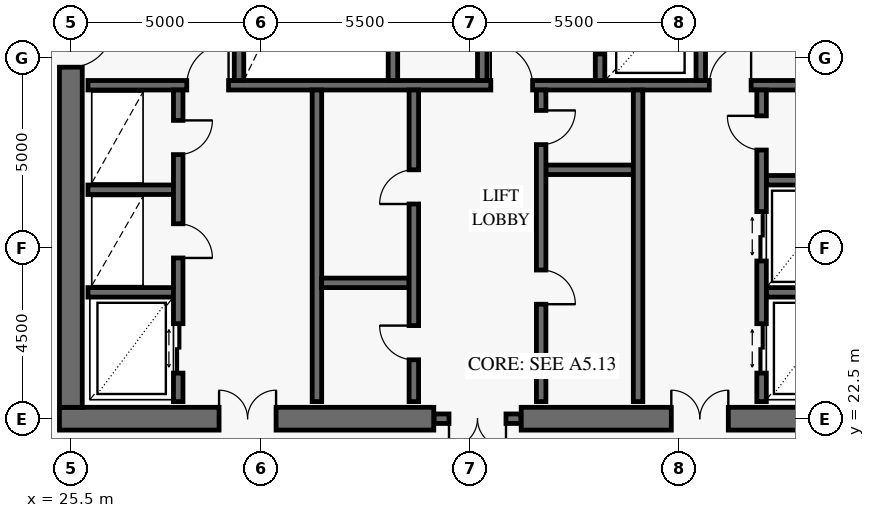
"""IFC4 building model, lengths in metres.
Left out: names, types, materials, properties, quantities, classifications, styles, units other than length and angle.
Written with IfcOpenShell. Run it as: python <this file> out.ifc"""

import sys

from ifc_helpers import new_model, si_unit, direction, frame, frame_2d, origin, place, context, subcontext, project, spatial, rectangle, extrude, element, fill, save


model = new_model("IFC4")
c1 = context("Model", 3, precision=1e-05, world=origin(), true_north=direction((0.0, 1.0)))
c2 = subcontext(c1, "Body", "Model", "MODEL_VIEW")
j1 = project(units=[si_unit("LENGTHUNIT", "METRE"), si_unit("PLANEANGLEUNIT", "RADIAN")], contexts=[c1])
p1 = place(None, origin())
s1 = spatial("IfcSite", under=j1, at=p1, CompositionType="ELEMENT")
p2 = place(p1, origin())
s2 = spatial("IfcBuilding", under=s1, at=p2, CompositionType="ELEMENT")
p3 = place(p2, frame((0.0, 0.0, 295.8)))
s3 = spatial("IfcBuildingStorey", under=s2, at=p3, CompositionType="ELEMENT", Elevation=295.8)
p4 = place(p3, frame((25.2, 22.5, 0.0), z_axis=(0.0, 0.0, 1.0), x_axis=(1.0, 0.0, 0.0)))
e1 = element("IfcWall", 1, at=p4, inside=s3, PredefinedType="SHEAR", context=c2, shape_type="SweptSolid", body=[
    extrude(rectangle(XDim=9.85, YDim=0.6, at=frame_2d((4.925, 0.0))), origin(), (0.0, 0.0, 1.0), 3.8),
])
p5 = place(p4, frame((4.2, 0.0, 0.0)))
e2 = element("IfcOpeningElement", 2, at=p5, cuts=e1, PredefinedType="OPENING", context=c2, shape_type="SweptSolid", body=[
    extrude(rectangle(XDim=1.5, YDim=2.15, at=frame_2d((0.75, 1.075))), frame((0.0, 0.312, 0.0), z_axis=(0.0, -1.0, 0.0), x_axis=(1.0, 0.0, 0.0)), (0.0, 0.0, 1.0), 0.624),
])
p6 = place(p3, frame((37.35, 22.5, 0.0), z_axis=(0.0, 0.0, 1.0), x_axis=(1.0, 0.0, 0.0)))
e3 = element("IfcWall", 3, at=p6, inside=s3, PredefinedType="SHEAR", context=c2, shape_type="SweptSolid", body=[
    extrude(rectangle(XDim=9.45, YDim=0.6, at=frame_2d((4.725, 0.0))), origin(), (0.0, 0.0, 1.0), 3.8),
])
p7 = place(p6, frame((3.95, 0.0, 0.0)))
e4 = element("IfcOpeningElement", 4, at=p7, cuts=e3, PredefinedType="OPENING", context=c2, shape_type="SweptSolid", body=[
    extrude(rectangle(XDim=1.5, YDim=2.15, at=frame_2d((0.75, 1.075))), frame((0.0, 0.312, 0.0), z_axis=(0.0, -1.0, 0.0), x_axis=(1.0, 0.0, 0.0)), (0.0, 0.0, 1.0), 0.624),
])
p8 = place(p3, frame((25.5, 22.8, 0.0), z_axis=(0.0, 0.0, 1.0), x_axis=(0.0, 1.0, 0.0)))
e5 = element("IfcWall", 5, at=p8, inside=s3, PredefinedType="SHEAR", context=c2, shape_type="SweptSolid", body=[
    extrude(rectangle(XDim=18.4, YDim=0.6, at=frame_2d((9.2, 0.0))), origin(), (0.0, 0.0, 1.0), 3.8),
])
p9 = place(p8, frame((8.95, 0.0, 0.0)))
e6 = element("IfcOpeningElement", 6, at=p9, cuts=e5, PredefinedType="OPENING", context=c2, shape_type="SweptSolid", body=[
    extrude(rectangle(XDim=1.1, YDim=2.15, at=frame_2d((0.55, 1.075))), frame((0.0, 0.312, 0.0), z_axis=(0.0, -1.0, 0.0), x_axis=(1.0, 0.0, 0.0)), (0.0, 0.0, 1.0), 0.624),
])
p10 = place(p3, frame((35.06, 22.5, 0.0), z_axis=(0.0, 0.0, 1.0), x_axis=(1.0, 0.0, 0.0)))
e7 = element("IfcWall", 7, at=p10, inside=s3, PredefinedType="SOLIDWALL", context=c2, shape_type="SweptSolid", body=[
    extrude(rectangle(XDim=2.28, YDim=0.25, at=frame_2d((1.14, 0.0))), origin(), (0.0, 0.0, 1.0), 3.8),
])
p11 = place(p10, frame((0.39, 0.0, 0.0)))
e8 = element("IfcOpeningElement", 8, at=p11, cuts=e7, PredefinedType="OPENING", context=c2, shape_type="SweptSolid", body=[
    extrude(rectangle(XDim=1.5, YDim=2.15, at=frame_2d((0.75, 1.075))), frame((0.0, 0.137, 0.0), z_axis=(0.0, -1.0, 0.0), x_axis=(1.0, 0.0, 0.0)), (0.0, 0.0, 1.0), 0.274),
])
p12 = place(p3, frame((25.95, 31.275, 0.0), z_axis=(0.0, 0.0, 1.0), x_axis=(1.0, 0.0, 0.0)))
e9 = element("IfcWall", 9, at=p12, inside=s3, PredefinedType="SOLIDWALL", context=c2, shape_type="SweptSolid", body=[
    extrude(rectangle(XDim=20.1, YDim=0.25, at=frame_2d((10.05, 0.0))), origin(), (0.0, 0.0, 1.0), 3.8),
])
p13 = place(p12, frame((2.6, 0.0, 0.0)))
e10 = element("IfcOpeningElement", 10, at=p13, cuts=e9, PredefinedType="OPENING", context=c2, shape_type="SweptSolid", body=[
    extrude(rectangle(XDim=1.1, YDim=2.15, at=frame_2d((0.55, 1.075))), frame((0.0, 0.137, 0.0), z_axis=(0.0, -1.0, 0.0), x_axis=(1.0, 0.0, 0.0)), (0.0, 0.0, 1.0), 0.274),
])
p14 = place(p12, frame((10.6, 0.0, 0.0)))
e11 = element("IfcOpeningElement", 11, at=p14, cuts=e9, PredefinedType="OPENING", context=c2, shape_type="SweptSolid", body=[
    extrude(rectangle(XDim=1.1, YDim=2.15, at=frame_2d((0.55, 1.075))), frame((0.0, 0.137, 0.0), z_axis=(0.0, -1.0, 0.0), x_axis=(1.0, 0.0, 0.0)), (0.0, 0.0, 1.0), 0.274),
])
p15 = place(p12, frame((16.35, 0.0, 0.0)))
e12 = element("IfcOpeningElement", 12, at=p15, cuts=e9, PredefinedType="OPENING", context=c2, shape_type="SweptSolid", body=[
    extrude(rectangle(XDim=1.1, YDim=2.15, at=frame_2d((0.55, 1.075))), frame((0.0, 0.137, 0.0), z_axis=(0.0, -1.0, 0.0), x_axis=(1.0, 0.0, 0.0)), (0.0, 0.0, 1.0), 0.274),
])
for number, where, z_axis, x_axis in (
    (13, (29.925, 31.4, 0.0), (0.0, 0.0, 1.0), (0.0, 1.0, 0.0)),
    (14, (33.975, 31.4, 0.0), (0.0, 0.0, 1.0), (0.0, 1.0, 0.0)),
    (15, (42.075, 31.4, 0.0), (0.0, 0.0, 1.0), (0.0, 1.0, 0.0)),
):
    element("IfcWall", number, at=place(p3, frame(where, z_axis=z_axis, x_axis=x_axis)), inside=s3, PredefinedType="SOLIDWALL", context=c2, shape_type="SweptSolid", body=[
        extrude(rectangle(XDim=9.7, YDim=0.25, at=frame_2d((4.85, 0.0))), origin(), (0.0, 0.0, 1.0), 3.8),
    ])
p16 = place(p3, frame((36.325, 31.4, 0.0), z_axis=(0.0, 0.0, 1.0), x_axis=(0.0, 1.0, 0.0)))
e16 = element("IfcWall", 16, at=p16, inside=s3, PredefinedType="SOLIDWALL", context=c2, shape_type="SweptSolid", body=[
    extrude(rectangle(XDim=9.65, YDim=0.25, at=frame_2d((4.825, 0.0))), origin(), (0.0, 0.0, 1.0), 3.8),
])
p17 = place(p16, frame((2.965, 0.0, 0.0)))
e17 = element("IfcOpeningElement", 17, at=p17, cuts=e16, PredefinedType="OPENING", context=c2, shape_type="SweptSolid", body=[
    extrude(rectangle(XDim=0.9, YDim=2.1, at=frame_2d((0.45, 1.05))), frame((0.0, 0.137, 0.0), z_axis=(0.0, -1.0, 0.0), x_axis=(1.0, 0.0, 0.0)), (0.0, 0.0, 1.0), 0.274),
])
p18 = place(p16, frame((7.885, 0.0, 0.0)))
e18 = element("IfcOpeningElement", 18, at=p18, cuts=e16, PredefinedType="OPENING", context=c2, shape_type="SweptSolid", body=[
    extrude(rectangle(XDim=0.9, YDim=2.1, at=frame_2d((0.45, 1.05))), frame((0.0, 0.137, 0.0), z_axis=(0.0, -1.0, 0.0), x_axis=(1.0, 0.0, 0.0)), (0.0, 0.0, 1.0), 0.274),
])
p19 = place(p3, frame((39.425, 31.4, 0.0), z_axis=(0.0, 0.0, 1.0), x_axis=(0.0, 1.0, 0.0)))
e19 = element("IfcWall", 19, at=p19, inside=s3, PredefinedType="SOLIDWALL", context=c2, shape_type="SweptSolid", body=[
    extrude(rectangle(XDim=9.65, YDim=0.25, at=frame_2d((4.825, 0.0))), origin(), (0.0, 0.0, 1.0), 3.8),
])
p20 = place(p19, frame((0.7, 0.0, 0.0)))
e20 = element("IfcOpeningElement", 20, at=p20, cuts=e19, PredefinedType="OPENING", context=c2, shape_type="SweptSolid", body=[
    extrude(rectangle(XDim=1.1, YDim=2.2, at=frame_2d((0.55, 1.1))), frame((0.0, 0.137, 0.0), z_axis=(0.0, -1.0, 0.0), x_axis=(1.0, 0.0, 0.0)), (0.0, 0.0, 1.0), 0.274),
])
p21 = place(p19, frame((3.45, 0.0, 0.0)))
e21 = element("IfcOpeningElement", 21, at=p21, cuts=e19, PredefinedType="OPENING", context=c2, shape_type="SweptSolid", body=[
    extrude(rectangle(XDim=1.1, YDim=2.2, at=frame_2d((0.55, 1.1))), frame((0.0, 0.137, 0.0), z_axis=(0.0, -1.0, 0.0), x_axis=(1.0, 0.0, 0.0)), (0.0, 0.0, 1.0), 0.274),
])
p22 = place(p19, frame((6.2, 0.0, 0.0)))
e22 = element("IfcOpeningElement", 22, at=p22, cuts=e19, PredefinedType="OPENING", context=c2, shape_type="SweptSolid", body=[
    extrude(rectangle(XDim=1.1, YDim=2.2, at=frame_2d((0.55, 1.1))), frame((0.0, 0.137, 0.0), z_axis=(0.0, -1.0, 0.0), x_axis=(1.0, 0.0, 0.0)), (0.0, 0.0, 1.0), 0.274),
])
p23 = place(p19, frame((8.47, 0.0, 0.0)))
e23 = element("IfcOpeningElement", 23, at=p23, cuts=e19, PredefinedType="OPENING", context=c2, shape_type="SweptSolid", body=[
    extrude(rectangle(XDim=0.9, YDim=2.1, at=frame_2d((0.45, 1.05))), frame((0.0, 0.137, 0.0), z_axis=(0.0, -1.0, 0.0), x_axis=(1.0, 0.0, 0.0)), (0.0, 0.0, 1.0), 0.274),
])
for number, where, z_axis, x_axis in (
    (24, (25.95, 25.825, 0.0), (0.0, 0.0, 1.0), (1.0, 0.0, 0.0)),
    (25, (25.95, 28.525, 0.0), (0.0, 0.0, 1.0), (1.0, 0.0, 0.0)),
):
    element("IfcWall", number, at=place(p3, frame(where, z_axis=z_axis, x_axis=x_axis)), inside=s3, PredefinedType="SOLIDWALL", context=c2, shape_type="SweptSolid", body=[
        extrude(rectangle(XDim=2.25, YDim=0.25, at=frame_2d((1.125, 0.0))), origin(), (0.0, 0.0, 1.0), 3.8),
    ])
p24 = place(p3, frame((28.325, 22.95, 0.0), z_axis=(0.0, 0.0, 1.0), x_axis=(0.0, 1.0, 0.0)))
e26 = element("IfcWall", 26, at=p24, inside=s3, PredefinedType="SOLIDWALL", context=c2, shape_type="SweptSolid", body=[
    extrude(rectangle(XDim=8.2, YDim=0.25, at=frame_2d((4.1, 0.0))), origin(), (0.0, 0.0, 1.0), 3.8),
])
p25 = place(p24, frame((0.75, 0.0, 0.0)))
e27 = element("IfcOpeningElement", 27, at=p25, cuts=e26, PredefinedType="OPENING", context=c2, shape_type="SweptSolid", body=[
    extrude(rectangle(XDim=1.3, YDim=2.3, at=frame_2d((0.65, 1.15))), frame((0.0, 0.137, 0.0), z_axis=(0.0, -1.0, 0.0), x_axis=(1.0, 0.0, 0.0)), (0.0, 0.0, 1.0), 0.274),
])
p26 = place(p24, frame((3.78, 0.0, 0.0)))
e28 = element("IfcOpeningElement", 28, at=p26, cuts=e26, PredefinedType="OPENING", context=c2, shape_type="SweptSolid", body=[
    extrude(rectangle(XDim=0.9, YDim=2.1, at=frame_2d((0.45, 1.05))), frame((0.0, 0.137, 0.0), z_axis=(0.0, -1.0, 0.0), x_axis=(1.0, 0.0, 0.0)), (0.0, 0.0, 1.0), 0.274),
])
p27 = place(p24, frame((6.5, 0.0, 0.0)))
e29 = element("IfcOpeningElement", 29, at=p27, cuts=e26, PredefinedType="OPENING", context=c2, shape_type="SweptSolid", body=[
    extrude(rectangle(XDim=0.9, YDim=2.1, at=frame_2d((0.45, 1.05))), frame((0.0, 0.137, 0.0), z_axis=(0.0, -1.0, 0.0), x_axis=(1.0, 0.0, 0.0)), (0.0, 0.0, 1.0), 0.274),
])
p28 = place(p3, frame((31.975, 22.95, 0.0), z_axis=(0.0, 0.0, 1.0), x_axis=(0.0, 1.0, 0.0)))
e30 = element("IfcWall", 30, at=p28, inside=s3, PredefinedType="SOLIDWALL", context=c2, shape_type="SweptSolid", body=[
    extrude(rectangle(XDim=8.2, YDim=0.25, at=frame_2d((4.1, 0.0))), origin(), (0.0, 0.0, 1.0), 3.8),
])
p29 = place(p3, frame((32.1, 26.075, 0.0), z_axis=(0.0, 0.0, 1.0), x_axis=(1.0, 0.0, 0.0)))
e31 = element("IfcWall", 31, at=p29, inside=s3, PredefinedType="SOLIDWALL", context=c2, shape_type="SweptSolid", body=[
    extrude(rectangle(XDim=2.3, YDim=0.25, at=frame_2d((1.15, 0.0))), origin(), (0.0, 0.0, 1.0), 3.8),
])
p30 = place(p3, frame((34.525, 22.95, 0.0), z_axis=(0.0, 0.0, 1.0), x_axis=(0.0, 1.0, 0.0)))
e32 = element("IfcWall", 32, at=p30, inside=s3, PredefinedType="SOLIDWALL", context=c2, shape_type="SweptSolid", body=[
    extrude(rectangle(XDim=8.2, YDim=0.25, at=frame_2d((4.1, 0.0))), origin(), (0.0, 0.0, 1.0), 3.8),
])
p31 = place(p30, frame((1.1, 0.0, 0.0)))
e33 = element("IfcOpeningElement", 33, at=p31, cuts=e32, PredefinedType="OPENING", context=c2, shape_type="SweptSolid", body=[
    extrude(rectangle(XDim=0.9, YDim=2.1, at=frame_2d((0.45, 1.05))), frame((0.0, 0.137, 0.0), z_axis=(0.0, -1.0, 0.0), x_axis=(1.0, 0.0, 0.0)), (0.0, 0.0, 1.0), 0.274),
])
p32 = place(p30, frame((5.2, 0.0, 0.0)))
e34 = element("IfcOpeningElement", 34, at=p32, cuts=e32, PredefinedType="OPENING", context=c2, shape_type="SweptSolid", body=[
    extrude(rectangle(XDim=0.9, YDim=2.1, at=frame_2d((0.45, 1.05))), frame((0.0, 0.137, 0.0), z_axis=(0.0, -1.0, 0.0), x_axis=(1.0, 0.0, 0.0)), (0.0, 0.0, 1.0), 0.274),
])
p33 = place(p3, frame((38.0, 29.05, 0.0), z_axis=(0.0, 0.0, 1.0), x_axis=(1.0, 0.0, 0.0)))
e35 = element("IfcWall", 35, at=p33, inside=s3, PredefinedType="SOLIDWALL", context=c2, shape_type="SweptSolid", body=[
    extrude(rectangle(XDim=2.3, YDim=0.25, at=frame_2d((1.15, 0.0))), origin(), (0.0, 0.0, 1.0), 3.8),
])
p34 = place(p3, frame((37.875, 22.95, 0.0), z_axis=(0.0, 0.0, 1.0), x_axis=(0.0, 1.0, 0.0)))
e36 = element("IfcWall", 36, at=p34, inside=s3, PredefinedType="SOLIDWALL", context=c2, shape_type="SweptSolid", body=[
    extrude(rectangle(XDim=8.2, YDim=0.25, at=frame_2d((4.1, 0.0))), origin(), (0.0, 0.0, 1.0), 3.8),
])
p35 = place(p34, frame((2.562, 0.0, 0.0)))
e37 = element("IfcOpeningElement", 37, at=p35, cuts=e36, PredefinedType="OPENING", context=c2, shape_type="SweptSolid", body=[
    extrude(rectangle(XDim=0.9, YDim=2.1, at=frame_2d((0.45, 1.05))), frame((0.0, 0.137, 0.0), z_axis=(0.0, -1.0, 0.0), x_axis=(1.0, 0.0, 0.0)), (0.0, 0.0, 1.0), 0.274),
])
p36 = place(p34, frame((6.762, 0.0, 0.0)))
e38 = element("IfcOpeningElement", 38, at=p36, cuts=e36, PredefinedType="OPENING", context=c2, shape_type="SweptSolid", body=[
    extrude(rectangle(XDim=0.9, YDim=2.1, at=frame_2d((0.45, 1.05))), frame((0.0, 0.137, 0.0), z_axis=(0.0, -1.0, 0.0), x_axis=(1.0, 0.0, 0.0)), (0.0, 0.0, 1.0), 0.274),
])
p37 = place(p3, frame((40.425, 22.95, 0.0), z_axis=(0.0, 0.0, 1.0), x_axis=(0.0, 1.0, 0.0)))
e39 = element("IfcWall", 39, at=p37, inside=s3, PredefinedType="SOLIDWALL", context=c2, shape_type="SweptSolid", body=[
    extrude(rectangle(XDim=8.2, YDim=0.25, at=frame_2d((4.1, 0.0))), origin(), (0.0, 0.0, 1.0), 3.8),
])
for number, where, z_axis, x_axis in (
    (40, (43.8, 25.825, 0.0), (0.0, 0.0, 1.0), (1.0, 0.0, 0.0)),
    (41, (43.8, 28.775, 0.0), (0.0, 0.0, 1.0), (1.0, 0.0, 0.0)),
):
    element("IfcWall", number, at=place(p3, frame(where, z_axis=z_axis, x_axis=x_axis)), inside=s3, PredefinedType="SOLIDWALL", context=c2, shape_type="SweptSolid", body=[
        extrude(rectangle(XDim=2.25, YDim=0.25, at=frame_2d((1.125, 0.0))), origin(), (0.0, 0.0, 1.0), 3.8),
    ])
p38 = place(p3, frame((43.675, 22.95, 0.0), z_axis=(0.0, 0.0, 1.0), x_axis=(0.0, 1.0, 0.0)))
e42 = element("IfcWall", 42, at=p38, inside=s3, PredefinedType="SOLIDWALL", context=c2, shape_type="SweptSolid", body=[
    extrude(rectangle(XDim=8.2, YDim=0.25, at=frame_2d((4.1, 0.0))), origin(), (0.0, 0.0, 1.0), 3.8),
])
p39 = place(p38, frame((0.75, 0.0, 0.0)))
e43 = element("IfcOpeningElement", 43, at=p39, cuts=e42, PredefinedType="OPENING", context=c2, shape_type="SweptSolid", body=[
    extrude(rectangle(XDim=1.3, YDim=2.3, at=frame_2d((0.65, 1.15))), frame((0.0, 0.137, 0.0), z_axis=(0.0, -1.0, 0.0), x_axis=(1.0, 0.0, 0.0)), (0.0, 0.0, 1.0), 0.274),
])
p40 = place(p38, frame((3.7, 0.0, 0.0)))
e44 = element("IfcOpeningElement", 44, at=p40, cuts=e42, PredefinedType="OPENING", context=c2, shape_type="SweptSolid", body=[
    extrude(rectangle(XDim=1.3, YDim=2.3, at=frame_2d((0.65, 1.15))), frame((0.0, 0.137, 0.0), z_axis=(0.0, -1.0, 0.0), x_axis=(1.0, 0.0, 0.0)), (0.0, 0.0, 1.0), 0.274),
])
p41 = place(p38, frame((6.62, 0.0, 0.0)))
e45 = element("IfcOpeningElement", 45, at=p41, cuts=e42, PredefinedType="OPENING", context=c2, shape_type="SweptSolid", body=[
    extrude(rectangle(XDim=0.9, YDim=2.1, at=frame_2d((0.45, 1.05))), frame((0.0, 0.137, 0.0), z_axis=(0.0, -1.0, 0.0), x_axis=(1.0, 0.0, 0.0)), (0.0, 0.0, 1.0), 0.274),
])
p42 = place(p9, frame((1.1, 0.0, 0.0), z_axis=(0.0, 0.0, 1.0), x_axis=(-1.0, 0.0, 0.0)))
e46 = element("IfcDoor", 46, at=p42, inside=s3, OperationType="SINGLE_SWING_LEFT", PredefinedType="USERDEFINED", context=c2, shape_type="SweptSolid", body=[
    extrude(rectangle(XDim=1.1, YDim=2.15, at=frame_2d((0.55, 1.075))), frame((0.0, 0.025, 0.0), z_axis=(0.0, -1.0, 0.0), x_axis=(1.0, 0.0, 0.0)), (0.0, 0.0, 1.0), 0.05),
])
fill(e6, e46)
p43 = place(p5, origin())
e47 = element("IfcDoor", 47, at=p43, inside=s3, OperationType="DOUBLE_DOOR_SINGLE_SWING", PredefinedType="DOOR", context=c2, shape_type="SweptSolid", body=[
    extrude(rectangle(XDim=1.5, YDim=2.15, at=frame_2d((0.75, 1.075))), frame((0.0, 0.025, 0.0), z_axis=(0.0, -1.0, 0.0), x_axis=(1.0, 0.0, 0.0)), (0.0, 0.0, 1.0), 0.05),
])
fill(e2, e47)
p44 = place(p7, origin())
e48 = element("IfcDoor", 48, at=p44, inside=s3, OperationType="DOUBLE_DOOR_SINGLE_SWING", PredefinedType="DOOR", context=c2, shape_type="SweptSolid", body=[
    extrude(rectangle(XDim=1.5, YDim=2.15, at=frame_2d((0.75, 1.075))), frame((0.0, 0.025, 0.0), z_axis=(0.0, -1.0, 0.0), x_axis=(1.0, 0.0, 0.0)), (0.0, 0.0, 1.0), 0.05),
])
fill(e4, e48)
p45 = place(p11, frame((1.5, 0.0, 0.0), z_axis=(0.0, 0.0, 1.0), x_axis=(-1.0, 0.0, 0.0)))
e49 = element("IfcDoor", 49, at=p45, inside=s3, OperationType="DOUBLE_DOOR_SINGLE_SWING", PredefinedType="DOOR", context=c2, shape_type="SweptSolid", body=[
    extrude(rectangle(XDim=1.5, YDim=2.15, at=frame_2d((0.75, 1.075))), frame((0.0, 0.025, 0.0), z_axis=(0.0, -1.0, 0.0), x_axis=(1.0, 0.0, 0.0)), (0.0, 0.0, 1.0), 0.05),
])
fill(e8, e49)
p46 = place(p13, origin())
e50 = element("IfcDoor", 50, at=p46, inside=s3, OperationType="SINGLE_SWING_RIGHT", PredefinedType="USERDEFINED", context=c2, shape_type="SweptSolid", body=[
    extrude(rectangle(XDim=1.1, YDim=2.15, at=frame_2d((0.55, 1.075))), frame((0.0, 0.025, 0.0), z_axis=(0.0, -1.0, 0.0), x_axis=(1.0, 0.0, 0.0)), (0.0, 0.0, 1.0), 0.05),
])
fill(e10, e50)
p47 = place(p14, origin())
e51 = element("IfcDoor", 51, at=p47, inside=s3, OperationType="SINGLE_SWING_LEFT", PredefinedType="USERDEFINED", context=c2, shape_type="SweptSolid", body=[
    extrude(rectangle(XDim=1.1, YDim=2.15, at=frame_2d((0.55, 1.075))), frame((0.0, 0.025, 0.0), z_axis=(0.0, -1.0, 0.0), x_axis=(1.0, 0.0, 0.0)), (0.0, 0.0, 1.0), 0.05),
])
fill(e11, e51)
p48 = place(p15, origin())
e52 = element("IfcDoor", 52, at=p48, inside=s3, OperationType="SINGLE_SWING_RIGHT", PredefinedType="USERDEFINED", context=c2, shape_type="SweptSolid", body=[
    extrude(rectangle(XDim=1.1, YDim=2.15, at=frame_2d((0.55, 1.075))), frame((0.0, 0.025, 0.0), z_axis=(0.0, -1.0, 0.0), x_axis=(1.0, 0.0, 0.0)), (0.0, 0.0, 1.0), 0.05),
])
fill(e12, e52)
p49 = place(p20, origin())
e53 = element("IfcDoor", 53, at=p49, inside=s3, OperationType="DOUBLE_DOOR_SLIDING", PredefinedType="DOOR", context=c2, shape_type="SweptSolid", body=[
    extrude(rectangle(XDim=1.1, YDim=2.2, at=frame_2d((0.55, 1.1))), frame((0.0, 0.025, 0.0), z_axis=(0.0, -1.0, 0.0), x_axis=(1.0, 0.0, 0.0)), (0.0, 0.0, 1.0), 0.05),
])
fill(e20, e53)
p50 = place(p25, frame((1.3, 0.0, 0.0), z_axis=(0.0, 0.0, 1.0), x_axis=(-1.0, 0.0, 0.0)))
e54 = element("IfcDoor", 54, at=p50, inside=s3, OperationType="DOUBLE_DOOR_SLIDING", PredefinedType="DOOR", context=c2, shape_type="SweptSolid", body=[
    extrude(rectangle(XDim=1.3, YDim=2.3, at=frame_2d((0.65, 1.15))), frame((0.0, 0.025, 0.0), z_axis=(0.0, -1.0, 0.0), x_axis=(1.0, 0.0, 0.0)), (0.0, 0.0, 1.0), 0.05),
])
fill(e27, e54)
p51 = place(p26, frame((0.9, 0.0, 0.0), z_axis=(0.0, 0.0, 1.0), x_axis=(-1.0, 0.0, 0.0)))
e55 = element("IfcDoor", 55, at=p51, inside=s3, OperationType="SINGLE_SWING_RIGHT", PredefinedType="DOOR", context=c2, shape_type="SweptSolid", body=[
    extrude(rectangle(XDim=0.9, YDim=2.1, at=frame_2d((0.45, 1.05))), frame((0.0, 0.025, 0.0), z_axis=(0.0, -1.0, 0.0), x_axis=(1.0, 0.0, 0.0)), (0.0, 0.0, 1.0), 0.05),
])
fill(e28, e55)
p52 = place(p27, frame((0.9, 0.0, 0.0), z_axis=(0.0, 0.0, 1.0), x_axis=(-1.0, 0.0, 0.0)))
e56 = element("IfcDoor", 56, at=p52, inside=s3, OperationType="SINGLE_SWING_LEFT", PredefinedType="DOOR", context=c2, shape_type="SweptSolid", body=[
    extrude(rectangle(XDim=0.9, YDim=2.1, at=frame_2d((0.45, 1.05))), frame((0.0, 0.025, 0.0), z_axis=(0.0, -1.0, 0.0), x_axis=(1.0, 0.0, 0.0)), (0.0, 0.0, 1.0), 0.05),
])
fill(e29, e56)
p53 = place(p31, origin())
e57 = element("IfcDoor", 57, at=p53, inside=s3, OperationType="SINGLE_SWING_RIGHT", PredefinedType="DOOR", context=c2, shape_type="SweptSolid", body=[
    extrude(rectangle(XDim=0.9, YDim=2.1, at=frame_2d((0.45, 1.05))), frame((0.0, 0.025, 0.0), z_axis=(0.0, -1.0, 0.0), x_axis=(1.0, 0.0, 0.0)), (0.0, 0.0, 1.0), 0.05),
])
fill(e33, e57)
p54 = place(p32, origin())
e58 = element("IfcDoor", 58, at=p54, inside=s3, OperationType="SINGLE_SWING_LEFT", PredefinedType="DOOR", context=c2, shape_type="SweptSolid", body=[
    extrude(rectangle(XDim=0.9, YDim=2.1, at=frame_2d((0.45, 1.05))), frame((0.0, 0.025, 0.0), z_axis=(0.0, -1.0, 0.0), x_axis=(1.0, 0.0, 0.0)), (0.0, 0.0, 1.0), 0.05),
])
fill(e34, e58)
p55 = place(p35, frame((0.9, 0.0, 0.0), z_axis=(0.0, 0.0, 1.0), x_axis=(-1.0, 0.0, 0.0)))
e59 = element("IfcDoor", 59, at=p55, inside=s3, OperationType="SINGLE_SWING_RIGHT", PredefinedType="DOOR", context=c2, shape_type="SweptSolid", body=[
    extrude(rectangle(XDim=0.9, YDim=2.1, at=frame_2d((0.45, 1.05))), frame((0.0, 0.025, 0.0), z_axis=(0.0, -1.0, 0.0), x_axis=(1.0, 0.0, 0.0)), (0.0, 0.0, 1.0), 0.05),
])
fill(e37, e59)
p56 = place(p36, frame((0.9, 0.0, 0.0), z_axis=(0.0, 0.0, 1.0), x_axis=(-1.0, 0.0, 0.0)))
e60 = element("IfcDoor", 60, at=p56, inside=s3, OperationType="SINGLE_SWING_LEFT", PredefinedType="DOOR", context=c2, shape_type="SweptSolid", body=[
    extrude(rectangle(XDim=0.9, YDim=2.1, at=frame_2d((0.45, 1.05))), frame((0.0, 0.025, 0.0), z_axis=(0.0, -1.0, 0.0), x_axis=(1.0, 0.0, 0.0)), (0.0, 0.0, 1.0), 0.05),
])
fill(e38, e60)
p57 = place(p39, origin())
e61 = element("IfcDoor", 61, at=p57, inside=s3, OperationType="DOUBLE_DOOR_SLIDING", PredefinedType="DOOR", context=c2, shape_type="SweptSolid", body=[
    extrude(rectangle(XDim=1.3, YDim=2.3, at=frame_2d((0.65, 1.15))), frame((0.0, 0.025, 0.0), z_axis=(0.0, -1.0, 0.0), x_axis=(1.0, 0.0, 0.0)), (0.0, 0.0, 1.0), 0.05),
])
fill(e43, e61)
p58 = place(p40, origin())
e62 = element("IfcDoor", 62, at=p58, inside=s3, OperationType="DOUBLE_DOOR_SLIDING", PredefinedType="DOOR", context=c2, shape_type="SweptSolid", body=[
    extrude(rectangle(XDim=1.3, YDim=2.3, at=frame_2d((0.65, 1.15))), frame((0.0, 0.025, 0.0), z_axis=(0.0, -1.0, 0.0), x_axis=(1.0, 0.0, 0.0)), (0.0, 0.0, 1.0), 0.05),
])
fill(e44, e62)
p59 = place(p41, origin())
e63 = element("IfcDoor", 63, at=p59, inside=s3, OperationType="SINGLE_SWING_RIGHT", PredefinedType="DOOR", context=c2, shape_type="SweptSolid", body=[
    extrude(rectangle(XDim=0.9, YDim=2.1, at=frame_2d((0.45, 1.05))), frame((0.0, 0.025, 0.0), z_axis=(0.0, -1.0, 0.0), x_axis=(1.0, 0.0, 0.0)), (0.0, 0.0, 1.0), 0.05),
])
fill(e45, e63)
save(model, sys.argv[1])
